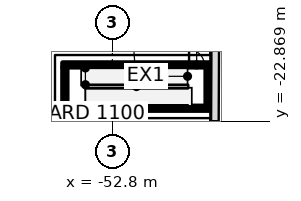
"""IFC4 building model, lengths in metres.
Left out: names, types, materials, properties, quantities, classifications, styles, units other than length and angle.
Written with IfcOpenShell. Run it as: python <this file> out.ifc"""

import sys

from ifc_helpers import new_model, si_unit, direction, frame, frame_2d, origin, place, context, subcontext, project, spatial, rectangle, extrude, element, fill, save


model = new_model("IFC4")
c1 = context("Model", 3, precision=1e-05, world=origin(), true_north=direction((0.0, 1.0)))
c2 = subcontext(c1, "Body", "Model", "MODEL_VIEW")
j1 = project(units=[si_unit("LENGTHUNIT", "METRE"), si_unit("PLANEANGLEUNIT", "RADIAN")], contexts=[c1])
p1 = place(None, origin())
s1 = spatial("IfcSite", under=j1, at=p1, CompositionType="ELEMENT")
p2 = place(p1, origin())
s2 = spatial("IfcBuilding", under=s1, at=p2, CompositionType="ELEMENT")
p3 = place(p2, origin())
s3 = spatial("IfcBuildingStorey", under=s2, at=p3, CompositionType="ELEMENT", Elevation=0.0)
p4 = place(p3, frame((-46.104, -33.627, 0.0), z_axis=(0.0, 0.0, 1.0), x_axis=(0.004546677584, 0.999989663808, 0.0)))
e1 = element("IfcWall", 1, at=p4, inside=s3, PredefinedType="STANDARD", context=c2, shape_type="SweptSolid", body=[
    extrude(rectangle(XDim=19.223, YDim=0.5, at=frame_2d((9.612, 0.0))), origin(), (0.0, 0.0, 1.0), 8.75),
])
p5 = place(p4, frame((8.35, 0.0, 0.0)))
e2 = element("IfcOpeningElement", 2, at=p5, cuts=e1, PredefinedType="OPENING", context=c2, shape_type="SweptSolid", body=[
    extrude(rectangle(XDim=2.4, YDim=2.8, at=frame_2d((1.2, 1.4))), frame((0.0, 0.25, 0.0), z_axis=(0.0, -1.0, 0.0), x_axis=(1.0, 0.0, 0.0)), (0.0, 0.0, 1.0), 0.5),
])
p6 = place(p3, frame((-56.075, -19.175, 0.0), z_axis=(0.0, 0.0, 1.0), x_axis=(1.0, 0.0, 0.0)))
e3 = element("IfcWall", 3, at=p6, inside=s3, PredefinedType="STANDARD", context=c2, shape_type="SweptSolid", body=[
    extrude(rectangle(XDim=9.72, YDim=0.3, at=frame_2d((4.86, 0.0))), origin(), (0.0, 0.0, 1.0), 12.2),
])
p7 = place(p6, frame((8.32, 0.0, 0.0)))
e4 = element("IfcOpeningElement", 4, at=p7, cuts=e3, PredefinedType="OPENING", context=c2, shape_type="SweptSolid", body=[
    extrude(rectangle(XDim=1.0, YDim=2.1, at=frame_2d((0.5, 1.05))), frame((0.0, 0.15, 0.0), z_axis=(0.0, -1.0, 0.0), x_axis=(1.0, 0.0, 0.0)), (0.0, 0.0, 1.0), 0.3),
])
p8 = place(p3, frame((-46.354, -22.025, 0.0), z_axis=(0.0, 0.0, 1.0), x_axis=(-1.0, 0.0, 0.0)))
e5 = element("IfcWall", 5, at=p8, inside=s3, PredefinedType="STANDARD", context=c2, shape_type="SweptSolid", body=[
    extrude(rectangle(XDim=9.72, YDim=0.3, at=frame_2d((4.86, 0.0))), origin(), (0.0, 0.0, 1.0), 12.2),
])
p9 = place(p3, frame((-55.925, -21.875, 0.0), z_axis=(0.0, 0.0, 1.0), x_axis=(0.0, 1.0, 0.0)))
e6 = element("IfcWall", 6, at=p9, inside=s3, PredefinedType="STANDARD", context=c2, shape_type="SweptSolid", body=[
    extrude(rectangle(XDim=2.55, YDim=0.3, at=frame_2d((1.275, 0.0))), origin(), (0.0, 0.0, 1.0), 12.2),
])
p10 = place(p3, frame((-46.505, -21.875, 0.0), z_axis=(0.0, 0.0, 1.0), x_axis=(0.0, 1.0, 0.0)))
e7 = element("IfcWall", 7, at=p10, inside=s3, PredefinedType="STANDARD", context=c2, shape_type="SweptSolid", body=[
    extrude(rectangle(XDim=2.55, YDim=0.3, at=frame_2d((1.275, 0.0))), origin(), (0.0, 0.0, 1.0), 9.0),
])
p11 = place(p7, origin())
e8 = element("IfcDoor", 8, at=p11, inside=s3, OperationType="SINGLE_SWING_LEFT", PredefinedType="DOOR", context=c2, shape_type="SweptSolid", body=[
    extrude(rectangle(XDim=1.0, YDim=2.1, at=frame_2d((0.5, 1.05))), frame((0.0, 0.025, 0.0), z_axis=(0.0, -1.0, 0.0), x_axis=(1.0, 0.0, 0.0)), (0.0, 0.0, 1.0), 0.05),
])
fill(e4, e8)
save(model, sys.argv[1])
